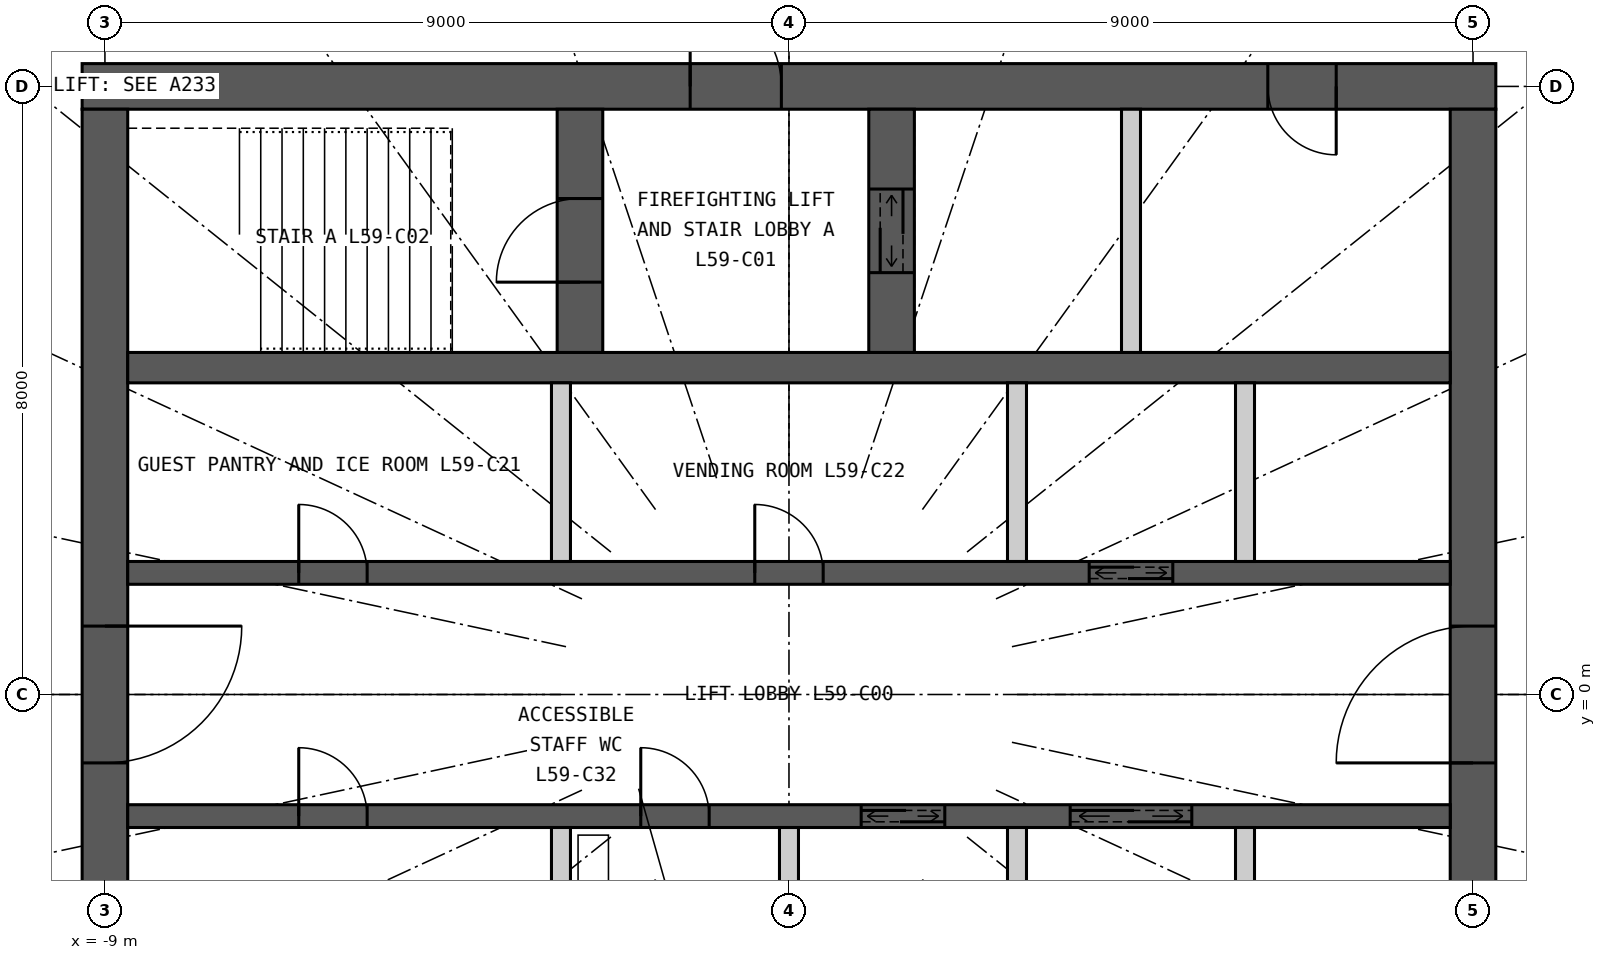
"""IFC4 building model, lengths in metres.
Left out: names, types, materials, properties, quantities, classifications, styles, units other than length and angle.
Written with IfcOpenShell. Run it as: python <this file> out.ifc"""

import sys

from ifc_helpers import new_model, si_unit, direction, frame, frame_2d, origin, place, context, subcontext, project, spatial, rectangle, extrude, element, fill, save


model = new_model("IFC4")
c1 = context("Model", 3, precision=1e-05, world=origin(), true_north=direction((0.0, 1.0)))
c2 = subcontext(c1, "Body", "Model", "MODEL_VIEW")
j1 = project(units=[si_unit("LENGTHUNIT", "METRE"), si_unit("PLANEANGLEUNIT", "RADIAN")], contexts=[c1])
p1 = place(None, origin())
s1 = spatial("IfcSite", under=j1, at=p1, CompositionType="ELEMENT")
p2 = place(p1, origin())
s2 = spatial("IfcBuilding", under=s1, at=p2, CompositionType="ELEMENT")
p3 = place(p2, frame((0.0, 0.0, 219.3)))
s3 = spatial("IfcBuildingStorey", under=s2, at=p3, CompositionType="ELEMENT", Elevation=219.3)
p4 = place(p3, frame((-9.3, 8.0, 0.0), z_axis=(0.0, 0.0, 1.0), x_axis=(1.0, 0.0, 0.0)))
e1 = element("IfcWall", 1, at=p4, inside=s3, PredefinedType="SHEAR", context=c2, shape_type="SweptSolid", body=[
    extrude(rectangle(XDim=18.6, YDim=0.6, at=frame_2d((9.3, 0.0))), origin(), (0.0, 0.0, 1.0), 3.3),
])
p5 = place(p4, frame((8.0, 0.0, 0.0)))
e2 = element("IfcOpeningElement", 2, at=p5, cuts=e1, PredefinedType="OPENING", context=c2, shape_type="SweptSolid", body=[
    extrude(rectangle(XDim=1.2, YDim=2.2, at=frame_2d((0.6, 1.1))), frame((0.0, 0.31, 0.0), z_axis=(0.0, -1.0, 0.0), x_axis=(1.0, 0.0, 0.0)), (0.0, 0.0, 1.0), 0.62),
])
p6 = place(p4, frame((15.6, 0.0, 0.0)))
e3 = element("IfcOpeningElement", 3, at=p6, cuts=e1, PredefinedType="OPENING", context=c2, shape_type="SweptSolid", body=[
    extrude(rectangle(XDim=0.9, YDim=2.2, at=frame_2d((0.45, 1.1))), frame((0.0, 0.31, 0.0), z_axis=(0.0, -1.0, 0.0), x_axis=(1.0, 0.0, 0.0)), (0.0, 0.0, 1.0), 0.62),
])
p7 = place(p3, frame((9.0, -7.7, 0.0), z_axis=(0.0, 0.0, 1.0), x_axis=(0.0, 1.0, 0.0)))
e4 = element("IfcWall", 4, at=p7, inside=s3, PredefinedType="SHEAR", context=c2, shape_type="SweptSolid", body=[
    extrude(rectangle(XDim=15.4, YDim=0.6, at=frame_2d((7.7, 0.0))), origin(), (0.0, 0.0, 1.0), 3.3),
])
p8 = place(p7, frame((6.8, 0.0, 0.0)))
e5 = element("IfcOpeningElement", 5, at=p8, cuts=e4, PredefinedType="OPENING", context=c2, shape_type="SweptSolid", body=[
    extrude(rectangle(XDim=1.8, YDim=2.2, at=frame_2d((0.9, 1.1))), frame((0.0, 0.31, 0.0), z_axis=(0.0, -1.0, 0.0), x_axis=(1.0, 0.0, 0.0)), (0.0, 0.0, 1.0), 0.62),
])
p9 = place(p3, frame((-9.0, 7.7, 0.0), z_axis=(0.0, 0.0, 1.0), x_axis=(0.0, -1.0, 0.0)))
e6 = element("IfcWall", 6, at=p9, inside=s3, PredefinedType="SHEAR", context=c2, shape_type="SweptSolid", body=[
    extrude(rectangle(XDim=15.4, YDim=0.6, at=frame_2d((7.7, 0.0))), origin(), (0.0, 0.0, 1.0), 3.3),
])
p10 = place(p9, frame((6.8, 0.0, 0.0)))
e7 = element("IfcOpeningElement", 7, at=p10, cuts=e6, PredefinedType="OPENING", context=c2, shape_type="SweptSolid", body=[
    extrude(rectangle(XDim=1.8, YDim=2.2, at=frame_2d((0.9, 1.1))), frame((0.0, 0.31, 0.0), z_axis=(0.0, -1.0, 0.0), x_axis=(1.0, 0.0, 0.0)), (0.0, 0.0, 1.0), 0.62),
])
p11 = place(p3, frame((-8.7, 4.3, 0.0), z_axis=(0.0, 0.0, 1.0), x_axis=(1.0, 0.0, 0.0)))
e8 = element("IfcWall", 8, at=p11, inside=s3, PredefinedType="SHEAR", context=c2, shape_type="SweptSolid", body=[
    extrude(rectangle(XDim=17.4, YDim=0.4, at=frame_2d((8.7, 0.0))), origin(), (0.0, 0.0, 1.0), 3.3),
])
p12 = place(p3, frame((-8.7, 1.6, 0.0), z_axis=(0.0, 0.0, 1.0), x_axis=(1.0, 0.0, 0.0)))
e9 = element("IfcWall", 9, at=p12, inside=s3, PredefinedType="SHEAR", context=c2, shape_type="SweptSolid", body=[
    extrude(rectangle(XDim=17.4, YDim=0.3, at=frame_2d((8.7, 0.0))), origin(), (0.0, 0.0, 1.0), 3.3),
])
p13 = place(p12, frame((12.65, 0.0, 0.0)))
e10 = element("IfcOpeningElement", 10, at=p13, cuts=e9, PredefinedType="OPENING", context=c2, shape_type="SweptSolid", body=[
    extrude(rectangle(XDim=1.1, YDim=2.2, at=frame_2d((0.55, 1.1))), frame((0.0, 0.16, 0.0), z_axis=(0.0, -1.0, 0.0), x_axis=(1.0, 0.0, 0.0)), (0.0, 0.0, 1.0), 0.32),
])
p14 = place(p12, frame((2.25, 0.0, 0.0)))
e11 = element("IfcOpeningElement", 11, at=p14, cuts=e9, PredefinedType="OPENING", context=c2, shape_type="SweptSolid", body=[
    extrude(rectangle(XDim=0.9, YDim=2.2, at=frame_2d((0.45, 1.1))), frame((0.0, 0.16, 0.0), z_axis=(0.0, -1.0, 0.0), x_axis=(1.0, 0.0, 0.0)), (0.0, 0.0, 1.0), 0.32),
])
p15 = place(p12, frame((8.25, 0.0, 0.0)))
e12 = element("IfcOpeningElement", 12, at=p15, cuts=e9, PredefinedType="OPENING", context=c2, shape_type="SweptSolid", body=[
    extrude(rectangle(XDim=0.9, YDim=2.2, at=frame_2d((0.45, 1.1))), frame((0.0, 0.16, 0.0), z_axis=(0.0, -1.0, 0.0), x_axis=(1.0, 0.0, 0.0)), (0.0, 0.0, 1.0), 0.32),
])
p16 = place(p3, frame((-8.7, -1.6, 0.0), z_axis=(0.0, 0.0, 1.0), x_axis=(1.0, 0.0, 0.0)))
e13 = element("IfcWall", 13, at=p16, inside=s3, PredefinedType="SHEAR", context=c2, shape_type="SweptSolid", body=[
    extrude(rectangle(XDim=17.4, YDim=0.3, at=frame_2d((8.7, 0.0))), origin(), (0.0, 0.0, 1.0), 3.3),
])
p17 = place(p16, frame((9.65, 0.0, 0.0)))
e14 = element("IfcOpeningElement", 14, at=p17, cuts=e13, PredefinedType="OPENING", context=c2, shape_type="SweptSolid", body=[
    extrude(rectangle(XDim=1.1, YDim=2.2, at=frame_2d((0.55, 1.1))), frame((0.0, 0.16, 0.0), z_axis=(0.0, -1.0, 0.0), x_axis=(1.0, 0.0, 0.0)), (0.0, 0.0, 1.0), 0.32),
])
p18 = place(p16, frame((12.4, 0.0, 0.0)))
e15 = element("IfcOpeningElement", 15, at=p18, cuts=e13, PredefinedType="OPENING", context=c2, shape_type="SweptSolid", body=[
    extrude(rectangle(XDim=1.6, YDim=2.4, at=frame_2d((0.8, 1.2))), frame((0.0, 0.16, 0.0), z_axis=(0.0, -1.0, 0.0), x_axis=(1.0, 0.0, 0.0)), (0.0, 0.0, 1.0), 0.32),
])
p19 = place(p16, frame((2.25, 0.0, 0.0)))
e16 = element("IfcOpeningElement", 16, at=p19, cuts=e13, PredefinedType="OPENING", context=c2, shape_type="SweptSolid", body=[
    extrude(rectangle(XDim=0.9, YDim=2.2, at=frame_2d((0.45, 1.1))), frame((0.0, 0.16, 0.0), z_axis=(0.0, -1.0, 0.0), x_axis=(1.0, 0.0, 0.0)), (0.0, 0.0, 1.0), 0.32),
])
p20 = place(p16, frame((6.75, 0.0, 0.0)))
e17 = element("IfcOpeningElement", 17, at=p20, cuts=e13, PredefinedType="OPENING", context=c2, shape_type="SweptSolid", body=[
    extrude(rectangle(XDim=0.9, YDim=2.2, at=frame_2d((0.45, 1.1))), frame((0.0, 0.16, 0.0), z_axis=(0.0, -1.0, 0.0), x_axis=(1.0, 0.0, 0.0)), (0.0, 0.0, 1.0), 0.32),
])
p21 = place(p3, frame((-2.75, 4.5, 0.0), z_axis=(0.0, 0.0, 1.0), x_axis=(0.0, 1.0, 0.0)))
e18 = element("IfcWall", 18, at=p21, inside=s3, PredefinedType="SHEAR", context=c2, shape_type="SweptSolid", body=[
    extrude(rectangle(XDim=3.2, YDim=0.6, at=frame_2d((1.6, 0.0))), origin(), (0.0, 0.0, 1.0), 3.3),
])
p22 = place(p21, frame((0.925, 0.0, 0.0)))
e19 = element("IfcOpeningElement", 19, at=p22, cuts=e18, PredefinedType="OPENING", context=c2, shape_type="SweptSolid", body=[
    extrude(rectangle(XDim=1.1, YDim=2.2, at=frame_2d((0.55, 1.1))), frame((0.0, 0.31, 0.0), z_axis=(0.0, -1.0, 0.0), x_axis=(1.0, 0.0, 0.0)), (0.0, 0.0, 1.0), 0.62),
])
p23 = place(p3, frame((1.35, 4.5, 0.0), z_axis=(0.0, 0.0, 1.0), x_axis=(0.0, 1.0, 0.0)))
e20 = element("IfcWall", 20, at=p23, inside=s3, PredefinedType="SHEAR", context=c2, shape_type="SweptSolid", body=[
    extrude(rectangle(XDim=3.2, YDim=0.6, at=frame_2d((1.6, 0.0))), origin(), (0.0, 0.0, 1.0), 3.3),
])
p24 = place(p23, frame((1.05, 0.0, 0.0)))
e21 = element("IfcOpeningElement", 21, at=p24, cuts=e20, PredefinedType="OPENING", context=c2, shape_type="SweptSolid", body=[
    extrude(rectangle(XDim=1.1, YDim=2.2, at=frame_2d((0.55, 1.1))), frame((0.0, 0.31, 0.0), z_axis=(0.0, -1.0, 0.0), x_axis=(1.0, 0.0, 0.0)), (0.0, 0.0, 1.0), 0.62),
])
p25 = place(p3, frame((4.5, 4.5, 0.0), z_axis=(0.0, 0.0, 1.0), x_axis=(0.0, 1.0, 0.0)))
e22 = element("IfcWall", 22, at=p25, inside=s3, PredefinedType="PARTITIONING", context=c2, shape_type="SweptSolid", body=[
    extrude(rectangle(XDim=3.2, YDim=0.25, at=frame_2d((1.6, 0.0))), origin(), (0.0, 0.0, 1.0), 3.3),
])
for number, where, z_axis, x_axis in (
    (23, (-3.0, 1.75, 0.0), (0.0, 0.0, 1.0), (0.0, 1.0, 0.0)),
    (24, (3.0, 1.75, 0.0), (0.0, 0.0, 1.0), (0.0, 1.0, 0.0)),
    (25, (6.0, 1.75, 0.0), (0.0, 0.0, 1.0), (0.0, 1.0, 0.0)),
    (26, (-3.0, -4.1, 0.0), (0.0, 0.0, 1.0), (0.0, 1.0, 0.0)),
    (27, (0.0, -4.1, 0.0), (0.0, 0.0, 1.0), (0.0, 1.0, 0.0)),
    (28, (3.0, -4.1, 0.0), (0.0, 0.0, 1.0), (0.0, 1.0, 0.0)),
    (29, (6.0, -4.1, 0.0), (0.0, 0.0, 1.0), (0.0, 1.0, 0.0)),
):
    element("IfcWall", number, at=place(p3, frame(where, z_axis=z_axis, x_axis=x_axis)), inside=s3, PredefinedType="PARTITIONING", context=c2, shape_type="SweptSolid", body=[
        extrude(rectangle(XDim=2.35, YDim=0.25, at=frame_2d((1.175, 0.0))), origin(), (0.0, 0.0, 1.0), 3.3),
    ])
p26 = place(p5, origin())
e30 = element("IfcDoor", 30, at=p26, inside=s3, OperationType="SINGLE_SWING_LEFT", PredefinedType="DOOR", context=c2, shape_type="SweptSolid", body=[
    extrude(rectangle(XDim=1.2, YDim=2.2, at=frame_2d((0.6, 1.1))), frame((0.0, 0.025, 0.0), z_axis=(0.0, -1.0, 0.0), x_axis=(1.0, 0.0, 0.0)), (0.0, 0.0, 1.0), 0.05),
])
fill(e2, e30)
p27 = place(p22, origin())
e31 = element("IfcDoor", 31, at=p27, inside=s3, OperationType="SINGLE_SWING_LEFT", PredefinedType="DOOR", context=c2, shape_type="SweptSolid", body=[
    extrude(rectangle(XDim=1.1, YDim=2.2, at=frame_2d((0.55, 1.1))), frame((0.0, 0.025, 0.0), z_axis=(0.0, -1.0, 0.0), x_axis=(1.0, 0.0, 0.0)), (0.0, 0.0, 1.0), 0.05),
])
fill(e19, e31)
p28 = place(p24, origin())
e32 = element("IfcDoor", 32, at=p28, inside=s3, OperationType="DOUBLE_DOOR_SLIDING", PredefinedType="DOOR", context=c2, shape_type="SweptSolid", body=[
    extrude(rectangle(XDim=1.1, YDim=2.2, at=frame_2d((0.55, 1.1))), frame((0.0, 0.025, 0.0), z_axis=(0.0, -1.0, 0.0), x_axis=(1.0, 0.0, 0.0)), (0.0, 0.0, 1.0), 0.05),
])
fill(e21, e32)
p29 = place(p6, origin())
e33 = element("IfcDoor", 33, at=p29, inside=s3, OperationType="SINGLE_SWING_RIGHT", PredefinedType="DOOR", context=c2, shape_type="SweptSolid", body=[
    extrude(rectangle(XDim=0.9, YDim=2.2, at=frame_2d((0.45, 1.1))), frame((0.0, 0.025, 0.0), z_axis=(0.0, -1.0, 0.0), x_axis=(1.0, 0.0, 0.0)), (0.0, 0.0, 1.0), 0.05),
])
fill(e3, e33)
p30 = place(p13, origin())
e34 = element("IfcDoor", 34, at=p30, inside=s3, OperationType="DOUBLE_DOOR_SLIDING", PredefinedType="DOOR", context=c2, shape_type="SweptSolid", body=[
    extrude(rectangle(XDim=1.1, YDim=2.2, at=frame_2d((0.55, 1.1))), frame((0.0, 0.025, 0.0), z_axis=(0.0, -1.0, 0.0), x_axis=(1.0, 0.0, 0.0)), (0.0, 0.0, 1.0), 0.05),
])
fill(e10, e34)
p31 = place(p17, origin())
e35 = element("IfcDoor", 35, at=p31, inside=s3, OperationType="DOUBLE_DOOR_SLIDING", PredefinedType="DOOR", context=c2, shape_type="SweptSolid", body=[
    extrude(rectangle(XDim=1.1, YDim=2.2, at=frame_2d((0.55, 1.1))), frame((0.0, 0.025, 0.0), z_axis=(0.0, -1.0, 0.0), x_axis=(1.0, 0.0, 0.0)), (0.0, 0.0, 1.0), 0.05),
])
fill(e14, e35)
p32 = place(p18, origin())
e36 = element("IfcDoor", 36, at=p32, inside=s3, OperationType="DOUBLE_DOOR_SLIDING", PredefinedType="DOOR", context=c2, shape_type="SweptSolid", body=[
    extrude(rectangle(XDim=1.6, YDim=2.4, at=frame_2d((0.8, 1.2))), frame((0.0, 0.025, 0.0), z_axis=(0.0, -1.0, 0.0), x_axis=(1.0, 0.0, 0.0)), (0.0, 0.0, 1.0), 0.05),
])
fill(e15, e36)
p33 = place(p14, origin())
e37 = element("IfcDoor", 37, at=p33, inside=s3, OperationType="SINGLE_SWING_LEFT", PredefinedType="DOOR", context=c2, shape_type="SweptSolid", body=[
    extrude(rectangle(XDim=0.9, YDim=2.2, at=frame_2d((0.45, 1.1))), frame((0.0, 0.025, 0.0), z_axis=(0.0, -1.0, 0.0), x_axis=(1.0, 0.0, 0.0)), (0.0, 0.0, 1.0), 0.05),
])
fill(e11, e37)
p34 = place(p15, origin())
e38 = element("IfcDoor", 38, at=p34, inside=s3, OperationType="SINGLE_SWING_LEFT", PredefinedType="DOOR", context=c2, shape_type="SweptSolid", body=[
    extrude(rectangle(XDim=0.9, YDim=2.2, at=frame_2d((0.45, 1.1))), frame((0.0, 0.025, 0.0), z_axis=(0.0, -1.0, 0.0), x_axis=(1.0, 0.0, 0.0)), (0.0, 0.0, 1.0), 0.05),
])
fill(e12, e38)
p35 = place(p19, origin())
e39 = element("IfcDoor", 39, at=p35, inside=s3, OperationType="SINGLE_SWING_LEFT", PredefinedType="DOOR", context=c2, shape_type="SweptSolid", body=[
    extrude(rectangle(XDim=0.9, YDim=2.2, at=frame_2d((0.45, 1.1))), frame((0.0, 0.025, 0.0), z_axis=(0.0, -1.0, 0.0), x_axis=(1.0, 0.0, 0.0)), (0.0, 0.0, 1.0), 0.05),
])
fill(e16, e39)
p36 = place(p20, origin())
e40 = element("IfcDoor", 40, at=p36, inside=s3, OperationType="SINGLE_SWING_LEFT", PredefinedType="DOOR", context=c2, shape_type="SweptSolid", body=[
    extrude(rectangle(XDim=0.9, YDim=2.2, at=frame_2d((0.45, 1.1))), frame((0.0, 0.025, 0.0), z_axis=(0.0, -1.0, 0.0), x_axis=(1.0, 0.0, 0.0)), (0.0, 0.0, 1.0), 0.05),
])
fill(e17, e40)
p37 = place(p8, origin())
e41 = element("IfcDoor", 41, at=p37, inside=s3, OperationType="DOUBLE_DOOR_DOUBLE_SWING", PredefinedType="DOOR", context=c2, shape_type="SweptSolid", body=[
    extrude(rectangle(XDim=1.8, YDim=2.2, at=frame_2d((0.9, 1.1))), frame((0.0, 0.025, 0.0), z_axis=(0.0, -1.0, 0.0), x_axis=(1.0, 0.0, 0.0)), (0.0, 0.0, 1.0), 0.05),
])
fill(e5, e41)
p38 = place(p10, origin())
e42 = element("IfcDoor", 42, at=p38, inside=s3, OperationType="DOUBLE_DOOR_DOUBLE_SWING", PredefinedType="DOOR", context=c2, shape_type="SweptSolid", body=[
    extrude(rectangle(XDim=1.8, YDim=2.2, at=frame_2d((0.9, 1.1))), frame((0.0, 0.025, 0.0), z_axis=(0.0, -1.0, 0.0), x_axis=(1.0, 0.0, 0.0)), (0.0, 0.0, 1.0), 0.05),
])
fill(e7, e42)
save(model, sys.argv[1])
